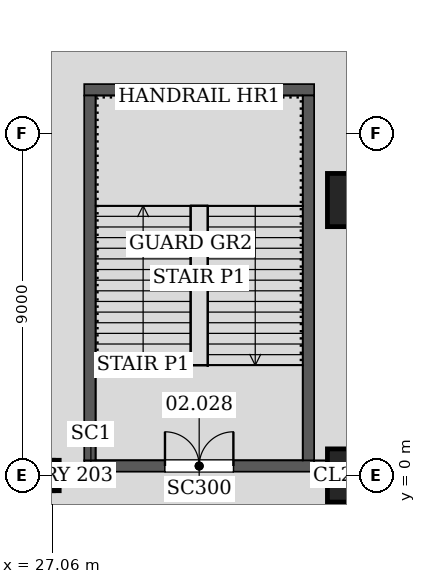
"""IFC4 building model, lengths in metres.
Left out: names, types, materials, properties, quantities, classifications, styles, units other than length and angle.
Written with IfcOpenShell. Run it as: python <this file> out.ifc"""

import sys

from ifc_helpers import new_model, si_unit, direction, frame, frame_2d, origin, origin_2d, place, context, subcontext, project, spatial, rectangle, hollow_rectangle, extrude, element, fill, save


model = new_model("IFC4")
c1 = context("Model", 3, precision=1e-05, world=origin(), true_north=direction((0.0, 1.0)))
c2 = subcontext(c1, "Body", "Model", "MODEL_VIEW")
j1 = project(units=[si_unit("LENGTHUNIT", "METRE"), si_unit("PLANEANGLEUNIT", "RADIAN")], contexts=[c1])
p1 = place(None, origin())
s1 = spatial("IfcSite", under=j1, at=p1, CompositionType="ELEMENT")
p2 = place(p1, origin())
s2 = spatial("IfcBuilding", under=s1, at=p2, CompositionType="ELEMENT")
p3 = place(p2, frame((0.0, 0.0, 13.2)))
s3 = spatial("IfcBuildingStorey", under=s2, at=p3, CompositionType="ELEMENT", Elevation=13.2)
p4 = place(p3, frame((25.963, 10.754, 0.0), z_axis=(-0.028288195063, -0.011703901791, 0.999531288506), x_axis=(0.3823083337, -0.92403481427, 0.0)))
e1 = element("IfcColumn", 1, at=p4, inside=s3, PredefinedType="COLUMN", context=c2, shape_type="SweptSolid", body=[
    extrude(hollow_rectangle(XDim=2.0, YDim=2.0, WallThickness=0.09, at=origin_2d()), origin(), (0.0, 0.0, 1.0), 5.403),
])
p5 = place(p3, frame((26.841, 0.0, 0.0), z_axis=(-0.028290132739, 0.0, 0.999599754096), x_axis=(0.0, -1.0, 0.0)))
e2 = element("IfcColumn", 2, at=p5, inside=s3, PredefinedType="COLUMN", context=c2, shape_type="SweptSolid", body=[
    extrude(hollow_rectangle(XDim=0.8, YDim=0.8, WallThickness=0.05, at=origin_2d()), origin(), (0.0, 0.0, 1.0), 5.402),
])
for number, where, z_axis, x_axis in (
    (3, (35.0, 0.0, 0.0), (0.0, 0.0, 1.0), (1.0, 0.0, 0.0)),
    (4, (35.0, 7.249, 0.0), (0.0, 0.0, 1.0), (1.0, 0.0, 0.0)),
):
    element("IfcColumn", number, at=place(p3, frame(where, z_axis=z_axis, x_axis=x_axis)), inside=s3, PredefinedType="COLUMN", context=c2, shape_type="SweptSolid", body=[
        extrude(rectangle(XDim=1.4, YDim=1.4, at=origin_2d()), origin(), (0.0, 0.0, 1.0), 5.4),
    ])
p6 = place(p3, frame((27.9, 0.25, 0.0), z_axis=(0.0, 0.0, 1.0), x_axis=(1.0, 0.0, 0.0)))
e5 = element("IfcWall", 5, at=p6, inside=s3, PredefinedType="SOLIDWALL", context=c2, shape_type="SweptSolid", body=[
    extrude(rectangle(XDim=6.05, YDim=0.3, at=frame_2d((3.025, 0.0))), origin(), (0.0, 0.0, 1.0), 5.4),
])
p7 = place(p6, frame((2.125, 0.0, 0.0)))
e6 = element("IfcOpeningElement", 6, at=p7, cuts=e5, PredefinedType="OPENING", context=c2, shape_type="SweptSolid", body=[
    extrude(rectangle(XDim=1.8, YDim=2.1, at=frame_2d((0.9, 1.05))), frame((0.0, 0.16, 0.0), z_axis=(0.0, -1.0, 0.0), x_axis=(1.0, 0.0, 0.0)), (0.0, 0.0, 1.0), 0.32),
])
p8 = place(p3, frame((33.95, 0.25, 0.0), z_axis=(0.0, 0.0, 1.0), x_axis=(1.0, 0.0, 0.0)))
e7 = element("IfcWall", 7, at=p8, inside=s3, PredefinedType="SOLIDWALL", context=c2, shape_type="SweptSolid", body=[
    extrude(rectangle(XDim=0.35, YDim=0.3, at=frame_2d((0.175, 0.0))), origin(), (0.0, 0.0, 1.0), 4.744),
])
p9 = place(p3, frame((33.95, 10.15, 0.0), z_axis=(0.0, 0.0, 1.0), x_axis=(-1.0, 0.0, 0.0)))
e8 = element("IfcWall", 8, at=p9, inside=s3, PredefinedType="SOLIDWALL", context=c2, shape_type="SweptSolid", body=[
    extrude(rectangle(XDim=6.05, YDim=0.3, at=frame_2d((3.025, 0.0))), origin(), (0.0, 0.0, 1.0), 5.4),
])
for number, where, z_axis, x_axis in (
    (9, (28.05, 10.0, 0.0), (0.0, 0.0, 1.0), (0.0, -1.0, 0.0)),
    (10, (33.8, 0.4, 0.0), (0.0, 0.0, 1.0), (0.0, 1.0, 0.0)),
):
    element("IfcWall", number, at=place(p3, frame(where, z_axis=z_axis, x_axis=x_axis)), inside=s3, PredefinedType="SOLIDWALL", context=c2, shape_type="SweptSolid", body=[
        extrude(rectangle(XDim=9.6, YDim=0.3, at=frame_2d((4.8, 0.0))), origin(), (0.0, 0.0, 1.0), 5.4),
    ])
p10 = place(p7, origin())
e11 = element("IfcDoor", 11, at=p10, inside=s3, OperationType="DOUBLE_DOOR_SINGLE_SWING", PredefinedType="DOOR", context=c2, shape_type="SweptSolid", body=[
    extrude(rectangle(XDim=1.8, YDim=2.1, at=frame_2d((0.9, 1.05))), frame((0.0, 0.025, 0.0), z_axis=(0.0, -1.0, 0.0), x_axis=(1.0, 0.0, 0.0)), (0.0, 0.0, 1.0), 0.05),
])
fill(e6, e11)
save(model, sys.argv[1])
